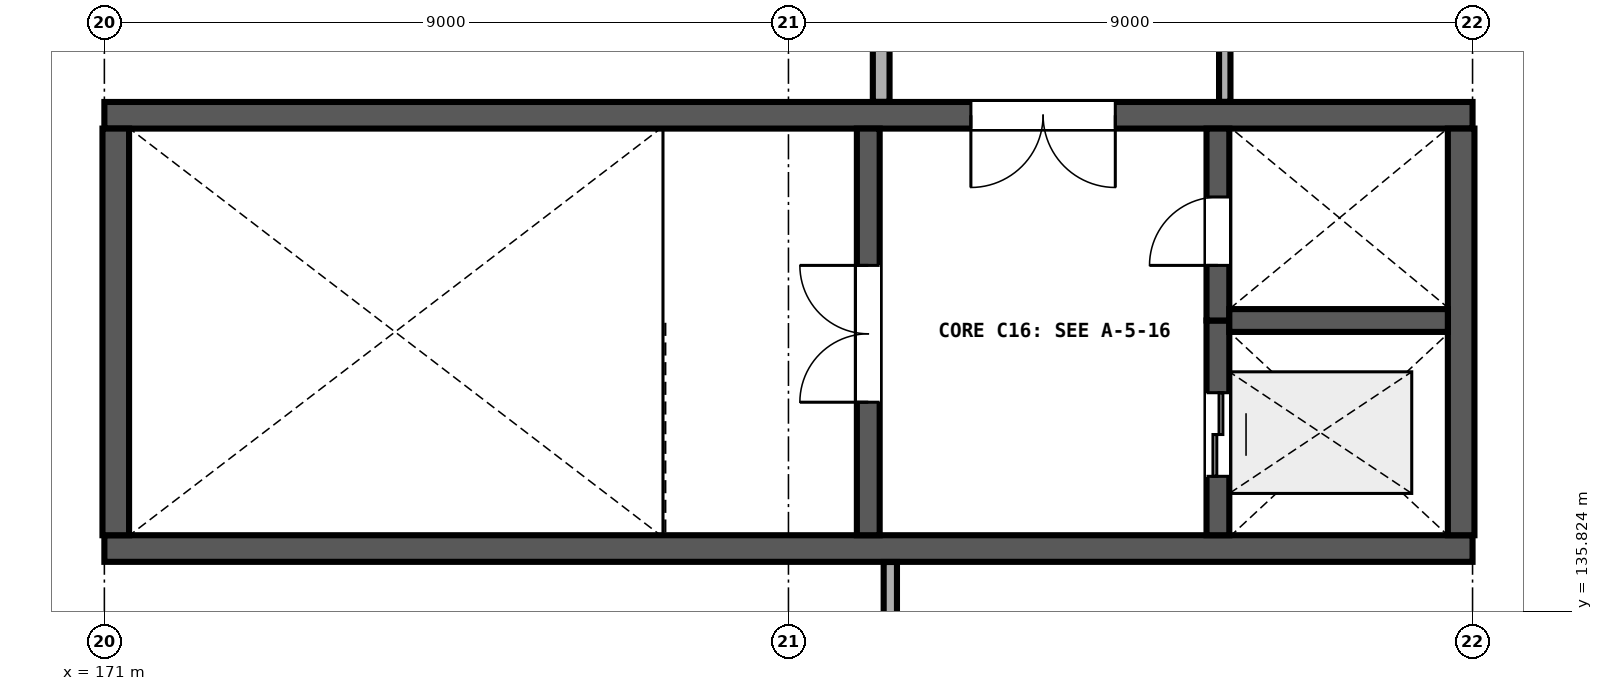
"""IFC4 building model, lengths in metres.
Left out: names, types, materials, properties, quantities, classifications, styles, units other than length and angle.
Written with IfcOpenShell. Run it as: python <this file> out.ifc"""

import sys

from ifc_helpers import new_model, si_unit, direction, frame, frame_2d, origin, place, context, subcontext, project, spatial, rectangle, extrude, element, fill, save


model = new_model("IFC4")
c1 = context("Model", 3, precision=1e-05, world=origin(), true_north=direction((0.0, 1.0)))
c2 = subcontext(c1, "Body", "Model", "MODEL_VIEW")
j1 = project(units=[si_unit("LENGTHUNIT", "METRE"), si_unit("PLANEANGLEUNIT", "RADIAN")], contexts=[c1])
p1 = place(None, origin())
s1 = spatial("IfcSite", under=j1, at=p1, CompositionType="ELEMENT")
p2 = place(p1, origin())
s2 = spatial("IfcBuilding", under=s1, at=p2, CompositionType="ELEMENT")
p3 = place(p2, frame((0.0, 0.0, 9.6)))
s3 = spatial("IfcBuildingStorey", under=s2, at=p3, CompositionType="ELEMENT", Elevation=9.6)
p4 = place(p3, frame((171.0, 136.65, 0.0), z_axis=(0.0, 0.0, 1.0), x_axis=(1.0, 0.0, 0.0)))
e1 = element("IfcWall", 1, at=p4, inside=s3, PredefinedType="SHEAR", context=c2, shape_type="SweptSolid", body=[
    extrude(rectangle(XDim=18.0, YDim=0.35, at=frame_2d((9.0, 0.0))), origin(), (0.0, 0.0, 1.0), 4.555),
])
p5 = place(p3, frame((189.0, 142.35, 0.0), z_axis=(0.0, 0.0, 1.0), x_axis=(-1.0, 0.0, 0.0)))
e2 = element("IfcWall", 2, at=p5, inside=s3, PredefinedType="SHEAR", context=c2, shape_type="SweptSolid", body=[
    extrude(rectangle(XDim=18.0, YDim=0.35, at=frame_2d((9.0, 0.0))), origin(), (0.0, 0.0, 1.0), 4.555),
])
p6 = place(p5, frame((4.7, 0.0, 0.0)))
e3 = element("IfcOpeningElement", 3, at=p6, cuts=e2, PredefinedType="OPENING", context=c2, shape_type="SweptSolid", body=[
    extrude(rectangle(XDim=1.9, YDim=2.25, at=frame_2d((0.95, 1.125))), frame((0.0, 0.185, 0.0), z_axis=(0.0, -1.0, 0.0), x_axis=(1.0, 0.0, 0.0)), (0.0, 0.0, 1.0), 0.37),
])
for number, where, z_axis, x_axis in (
    (4, (171.15, 142.175, 0.0), (0.0, 0.0, 1.0), (0.0, -1.0, 0.0)),
    (5, (188.85, 136.825, 0.0), (0.0, 0.0, 1.0), (0.0, 1.0, 0.0)),
):
    element("IfcWall", number, at=place(p3, frame(where, z_axis=z_axis, x_axis=x_axis)), inside=s3, PredefinedType="SHEAR", context=c2, shape_type="SweptSolid", body=[
        extrude(rectangle(XDim=5.35, YDim=0.35, at=frame_2d((2.675, 0.0))), origin(), (0.0, 0.0, 1.0), 4.555),
    ])
p7 = place(p3, frame((181.05, 136.825, 0.0), z_axis=(0.0, 0.0, 1.0), x_axis=(0.0, 1.0, 0.0)))
e6 = element("IfcWall", 6, at=p7, inside=s3, PredefinedType="SHEAR", context=c2, shape_type="SweptSolid", body=[
    extrude(rectangle(XDim=5.35, YDim=0.3, at=frame_2d((2.675, 0.0))), origin(), (0.0, 0.0, 1.0), 4.555),
])
p8 = place(p7, frame((1.75, 0.0, 0.0)))
e7 = element("IfcOpeningElement", 7, at=p8, cuts=e6, PredefinedType="OPENING", context=c2, shape_type="SweptSolid", body=[
    extrude(rectangle(XDim=1.8, YDim=2.25, at=frame_2d((0.9, 1.125))), frame((0.0, 0.16, 0.0), z_axis=(0.0, -1.0, 0.0), x_axis=(1.0, 0.0, 0.0)), (0.0, 0.0, 1.0), 0.32),
])
p9 = place(p3, frame((185.65, 136.825, 0.0), z_axis=(0.0, 0.0, 1.0), x_axis=(0.0, 1.0, 0.0)))
e8 = element("IfcWall", 8, at=p9, inside=s3, PredefinedType="SHEAR", context=c2, shape_type="SweptSolid", body=[
    extrude(rectangle(XDim=2.825, YDim=0.3, at=frame_2d((1.413, 0.0))), origin(), (0.0, 0.0, 1.0), 4.555),
])
p10 = place(p9, frame((0.775, 0.0, 0.0)))
e9 = element("IfcOpeningElement", 9, at=p10, cuts=e8, PredefinedType="OPENING", context=c2, shape_type="SweptSolid", body=[
    extrude(rectangle(XDim=1.1, YDim=2.1, at=frame_2d((0.55, 1.05))), frame((0.0, 0.16, 0.0), z_axis=(0.0, -1.0, 0.0), x_axis=(1.0, 0.0, 0.0)), (0.0, 0.0, 1.0), 0.32),
])
p11 = place(p3, frame((185.65, 139.65, 0.0), z_axis=(0.0, 0.0, 1.0), x_axis=(0.0, 1.0, 0.0)))
e10 = element("IfcWall", 10, at=p11, inside=s3, PredefinedType="SHEAR", context=c2, shape_type="SweptSolid", body=[
    extrude(rectangle(XDim=2.525, YDim=0.3, at=frame_2d((1.263, 0.0))), origin(), (0.0, 0.0, 1.0), 4.555),
])
p12 = place(p11, frame((0.725, 0.0, 0.0)))
e11 = element("IfcOpeningElement", 11, at=p12, cuts=e10, PredefinedType="OPENING", context=c2, shape_type="SweptSolid", body=[
    extrude(rectangle(XDim=0.9, YDim=2.1, at=frame_2d((0.45, 1.05))), frame((0.0, 0.16, 0.0), z_axis=(0.0, -1.0, 0.0), x_axis=(1.0, 0.0, 0.0)), (0.0, 0.0, 1.0), 0.32),
])
p13 = place(p3, frame((185.8, 139.65, 0.0), z_axis=(0.0, 0.0, 1.0), x_axis=(1.0, 0.0, 0.0)))
e12 = element("IfcWall", 12, at=p13, inside=s3, PredefinedType="SHEAR", context=c2, shape_type="SweptSolid", body=[
    extrude(rectangle(XDim=2.875, YDim=0.3, at=frame_2d((1.438, 0.0))), origin(), (0.0, 0.0, 1.0), 4.555),
])
p14 = place(p3, frame((185.74, 146.98, 0.0), z_axis=(0.0, 0.0, 1.0), x_axis=(0.0, -1.0, 0.0)))
e13 = element("IfcWall", 13, at=p14, inside=s3, PredefinedType="PARTITIONING", context=c2, shape_type="SweptSolid", body=[
    extrude(rectangle(XDim=4.453, YDim=0.15, at=frame_2d((2.227, 0.0))), origin(), (0.0, 0.0, 1.0), 3.56),
])
p15 = place(p14, frame((1.35, 0.0, 0.0)))
e14 = element("IfcOpeningElement", 14, at=p15, cuts=e13, PredefinedType="OPENING", context=c2, shape_type="SweptSolid", body=[
    extrude(rectangle(XDim=1.7, YDim=2.2, at=frame_2d((0.85, 1.1))), frame((0.0, 0.085, 0.0), z_axis=(0.0, -1.0, 0.0), x_axis=(1.0, 0.0, 0.0)), (0.0, 0.0, 1.0), 0.17),
])
p16 = place(p3, frame((181.34, 126.24, 0.0), z_axis=(0.0, 0.0, 1.0), x_axis=(0.0, 1.0, 0.0)))
e15 = element("IfcWall", 15, at=p16, inside=s3, PredefinedType="PARTITIONING", context=c2, shape_type="SweptSolid", body=[
    extrude(rectangle(XDim=10.233, YDim=0.175, at=frame_2d((5.116, 0.0))), origin(), (0.0, 0.0, 1.0), 3.56),
])
p17 = place(p3, frame((181.22, 146.94, 0.0), z_axis=(0.0, 0.0, 1.0), x_axis=(0.0, -1.0, 0.0)))
e16 = element("IfcWall", 16, at=p17, inside=s3, PredefinedType="PARTITIONING", context=c2, shape_type="SweptSolid", body=[
    extrude(rectangle(XDim=4.413, YDim=0.22, at=frame_2d((2.207, 0.0))), origin(), (0.0, 0.0, 1.0), 3.56),
])
p18 = place(p8, origin())
e17 = element("IfcDoor", 17, at=p18, inside=s3, OperationType="DOUBLE_DOOR_SINGLE_SWING", PredefinedType="DOOR", context=c2, shape_type="SweptSolid", body=[
    extrude(rectangle(XDim=1.8, YDim=2.25, at=frame_2d((0.9, 1.125))), frame((0.0, 0.025, 0.0), z_axis=(0.0, -1.0, 0.0), x_axis=(1.0, 0.0, 0.0)), (0.0, 0.0, 1.0), 0.05),
])
fill(e7, e17)
p19 = place(p12, origin())
e18 = element("IfcDoor", 18, at=p19, inside=s3, OperationType="SINGLE_SWING_LEFT", PredefinedType="DOOR", context=c2, shape_type="SweptSolid", body=[
    extrude(rectangle(XDim=0.9, YDim=2.1, at=frame_2d((0.45, 1.05))), frame((0.0, 0.025, 0.0), z_axis=(0.0, -1.0, 0.0), x_axis=(1.0, 0.0, 0.0)), (0.0, 0.0, 1.0), 0.05),
])
fill(e11, e18)
p20 = place(p10, origin())
e19 = element("IfcDoor", 19, at=p20, inside=s3, OperationType="DOUBLE_DOOR_SLIDING", PredefinedType="DOOR", context=c2, shape_type="SweptSolid", body=[
    extrude(rectangle(XDim=1.1, YDim=2.1, at=frame_2d((0.55, 1.05))), frame((0.0, 0.025, 0.0), z_axis=(0.0, -1.0, 0.0), x_axis=(1.0, 0.0, 0.0)), (0.0, 0.0, 1.0), 0.05),
])
fill(e9, e19)
p21 = place(p6, origin())
e20 = element("IfcDoor", 20, at=p21, inside=s3, OperationType="DOUBLE_DOOR_SINGLE_SWING", PredefinedType="DOOR", context=c2, shape_type="SweptSolid", body=[
    extrude(rectangle(XDim=1.9, YDim=2.25, at=frame_2d((0.95, 1.125))), frame((0.0, 0.025, 0.0), z_axis=(0.0, -1.0, 0.0), x_axis=(1.0, 0.0, 0.0)), (0.0, 0.0, 1.0), 0.05),
])
fill(e3, e20)
save(model, sys.argv[1])
